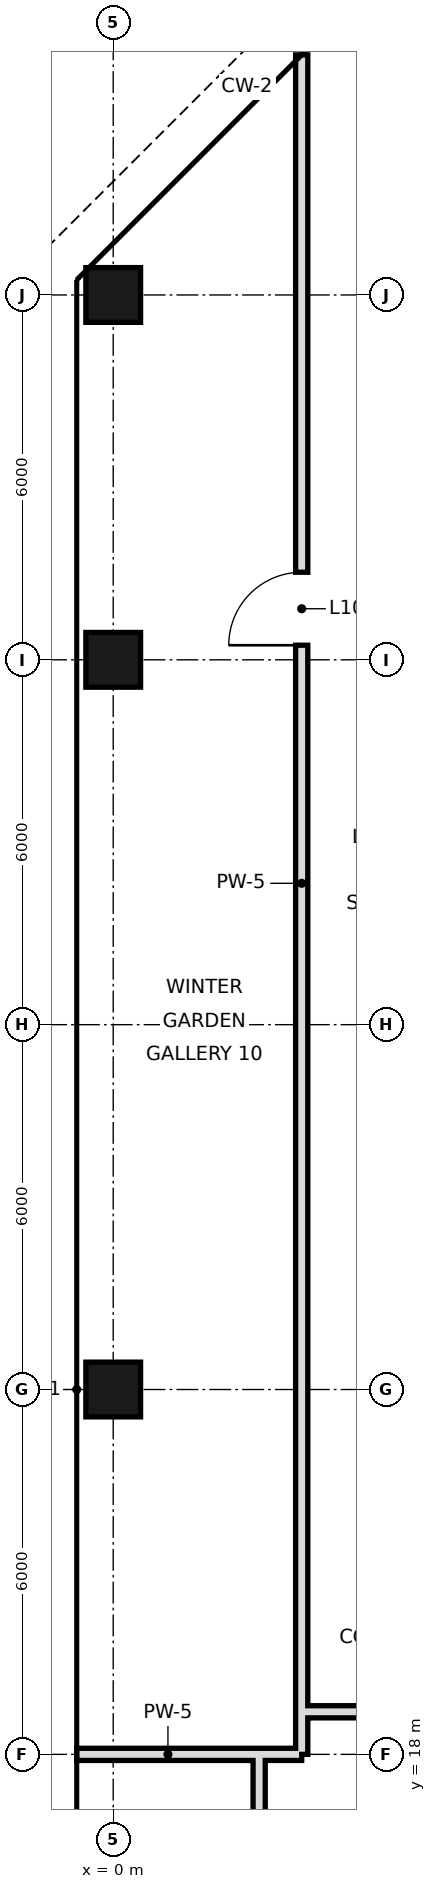
"""IFC4 building model, lengths in metres.
Left out: names, types, materials, properties, quantities, classifications, styles, units other than length and angle.
Written with IfcOpenShell. Run it as: python <this file> out.ifc"""

import sys

from ifc_helpers import new_model, si_unit, direction, frame, frame_2d, origin, origin_2d, place, context, subcontext, project, spatial, rectangle, hollow_rectangle, extrude, element, fill, save


model = new_model("IFC4")
c1 = context("Model", 3, precision=1e-05, world=origin(), true_north=direction((0.0, 1.0)))
c2 = subcontext(c1, "Body", "Model", "MODEL_VIEW")
j1 = project(units=[si_unit("LENGTHUNIT", "METRE"), si_unit("PLANEANGLEUNIT", "RADIAN")], contexts=[c1])
p1 = place(None, origin())
s1 = spatial("IfcSite", under=j1, at=p1, CompositionType="ELEMENT")
p2 = place(p1, origin())
s2 = spatial("IfcBuilding", under=s1, at=p2, CompositionType="ELEMENT")
p3 = place(p2, frame((0.0, 0.0, 57.0)))
s3 = spatial("IfcBuildingStorey", under=s2, at=p3, CompositionType="ELEMENT", Elevation=57.0)
for number, where, z_axis, x_axis in (
    (1, (0.0, 24.0, 0.0), (0.0, 0.0, 1.0), (1.0, 0.0, 0.0)),
    (2, (0.0, 36.0, 0.0), (0.0, 0.0, 1.0), (1.0, 0.0, 0.0)),
    (3, (0.0, 42.0, 0.0), (0.0, 0.0, 1.0), (1.0, 0.0, 0.0)),
):
    element("IfcColumn", number, at=place(p3, frame(where, z_axis=z_axis, x_axis=x_axis)), inside=s3, PredefinedType="COLUMN", context=c2, shape_type="SweptSolid", body=[
        extrude(hollow_rectangle(XDim=0.9, YDim=0.9, WallThickness=0.045, at=origin_2d()), origin(), (0.0, 0.0, 1.0), 3.6),
    ])
p4 = place(p3, frame((2.4, 10.8, 0.0), z_axis=(0.0, 0.0, 1.0), x_axis=(0.0, 1.0, 0.0)))
e4 = element("IfcWall", 4, at=p4, inside=s3, PredefinedType="SOLIDWALL", context=c2, shape_type="SweptSolid", body=[
    extrude(rectangle(XDim=7.2, YDim=0.2, at=frame_2d((3.6, 0.0))), origin(), (0.0, 0.0, 1.0), 2.72),
])
p5 = place(p3, frame((3.1, 18.7, 0.0), z_axis=(0.0, 0.0, 1.0), x_axis=(0.0, 1.0, 0.0)))
e5 = element("IfcWall", 5, at=p5, inside=s3, PredefinedType="SOLIDWALL", context=c2, shape_type="SweptSolid", body=[
    extrude(rectangle(XDim=27.249, YDim=0.2, at=frame_2d((13.625, 0.0))), origin(), (0.0, 0.0, 1.0), 2.97),
])
p6 = place(p5, frame((17.54, 0.0, 0.0)))
e6 = element("IfcOpeningElement", 6, at=p6, cuts=e5, PredefinedType="OPENING", context=c2, shape_type="SweptSolid", body=[
    extrude(rectangle(XDim=1.2, YDim=2.4, at=frame_2d((0.6, 1.2))), frame((0.0, 0.11, 0.0), z_axis=(0.0, -1.0, 0.0), x_axis=(1.0, 0.0, 0.0)), (0.0, 0.0, 1.0), 0.22),
])
p7 = place(p3, frame((3.1, 18.0, 0.0), z_axis=(0.0, 0.0, 1.0), x_axis=(0.0, 1.0, 0.0)))
e7 = element("IfcWall", 7, at=p7, inside=s3, PredefinedType="SOLIDWALL", context=c2, shape_type="SweptSolid", body=[
    extrude(rectangle(XDim=0.7, YDim=0.2, at=frame_2d((0.35, 0.0))), origin(), (0.0, 0.0, 1.0), 2.97),
])
p8 = place(p3, frame((-0.6, 18.0, 0.0), z_axis=(0.0, 0.0, 1.0), x_axis=(1.0, 0.0, 0.0)))
e8 = element("IfcWall", 8, at=p8, inside=s3, PredefinedType="SOLIDWALL", context=c2, shape_type="SweptSolid", body=[
    extrude(rectangle(XDim=3.0, YDim=0.2, at=frame_2d((1.5, 0.0))), origin(), (0.0, 0.0, 1.0), 2.72),
])
p9 = place(p3, frame((2.4, 18.0, 0.0), z_axis=(0.0, 0.0, 1.0), x_axis=(1.0, 0.0, 0.0)))
e9 = element("IfcWall", 9, at=p9, inside=s3, PredefinedType="SOLIDWALL", context=c2, shape_type="SweptSolid", body=[
    extrude(rectangle(XDim=0.7, YDim=0.2, at=frame_2d((0.35, 0.0))), origin(), (0.0, 0.0, 1.0), 2.97),
])
p10 = place(p3, frame((3.1, 18.7, 0.0), z_axis=(0.0, 0.0, 1.0), x_axis=(1.0, 0.0, 0.0)))
e10 = element("IfcWall", 10, at=p10, inside=s3, PredefinedType="SOLIDWALL", context=c2, shape_type="SweptSolid", body=[
    extrude(rectangle(XDim=3.5, YDim=0.2, at=frame_2d((1.75, 0.0))), origin(), (0.0, 0.0, 1.0), 2.72),
])
p11 = place(p6, origin())
e11 = element("IfcDoor", 11, at=p11, inside=s3, OperationType="SINGLE_SWING_LEFT", PredefinedType="DOOR", context=c2, shape_type="SweptSolid", body=[
    extrude(rectangle(XDim=1.2, YDim=2.4, at=frame_2d((0.6, 1.2))), frame((0.0, 0.025, 0.0), z_axis=(0.0, -1.0, 0.0), x_axis=(1.0, 0.0, 0.0)), (0.0, 0.0, 1.0), 0.05),
])
fill(e6, e11)
save(model, sys.argv[1])
